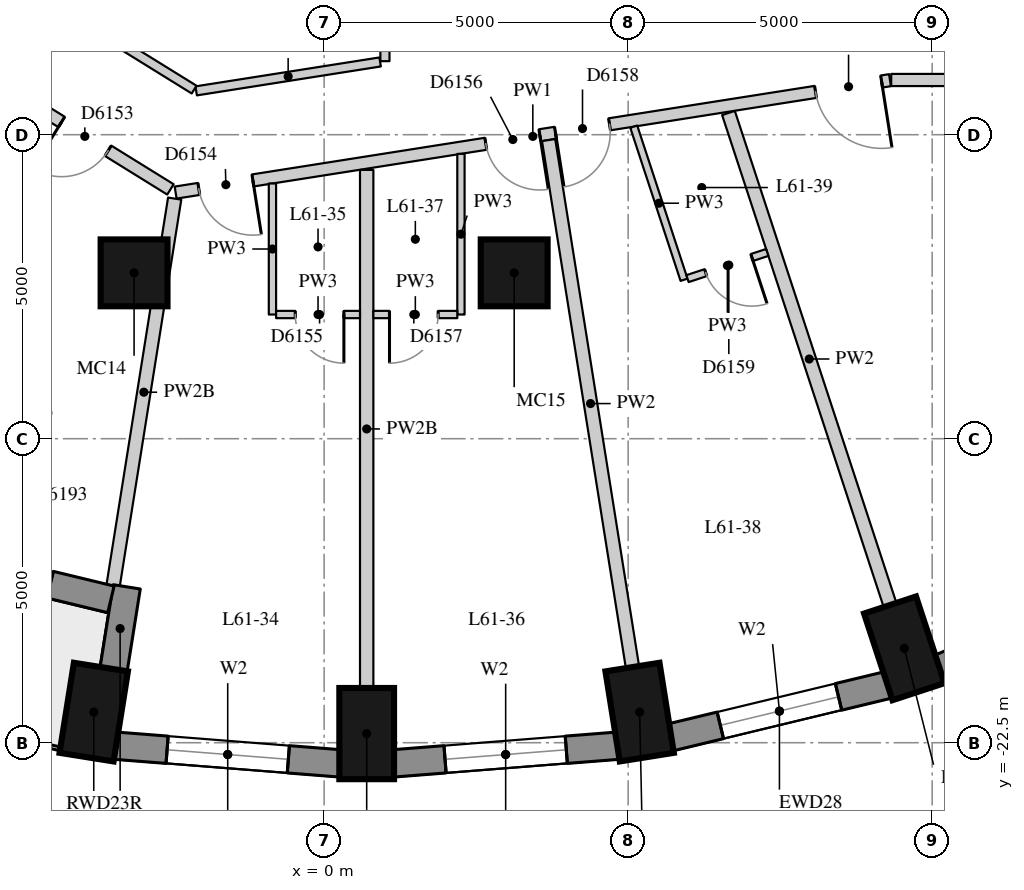
"""IFC4 building model, lengths in metres.
Left out: names, types, materials, properties, quantities, classifications, styles, units other than length and angle.
Written with IfcOpenShell. Run it as: python <this file> out.ifc"""

import sys

from ifc_helpers import new_model, si_unit, direction, frame, frame_2d, origin, origin_2d, place, context, subcontext, project, spatial, rectangle, extrude, element, fill, save


model = new_model("IFC4")
c1 = context("Model", 3, precision=1e-05, world=origin(), true_north=direction((0.0, 1.0)))
c2 = subcontext(c1, "Body", "Model", "MODEL_VIEW")
j1 = project(units=[si_unit("LENGTHUNIT", "METRE"), si_unit("PLANEANGLEUNIT", "RADIAN")], contexts=[c1])
p1 = place(None, origin())
s1 = spatial("IfcSite", under=j1, at=p1, CompositionType="ELEMENT")
p2 = place(p1, origin())
s2 = spatial("IfcBuilding", under=s1, at=p2, CompositionType="ELEMENT")
p3 = place(p2, frame((0.0, 0.0, 215.6)))
s3 = spatial("IfcBuildingStorey", under=s2, at=p3, CompositionType="ELEMENT", Elevation=215.6)
for number, where, z_axis, x_axis in (
    (1, (-3.789, -21.997, 0.0), (0.0, 0.0, 1.0), (-0.157, -0.988, 0.0)),
    (2, (0.7, -22.35, 0.0), (0.0, 0.0, 1.0), (0.0, -1.0, 0.0)),
    (3, (5.189, -21.997, 0.0), (0.0, 0.0, 1.0), (0.157, -0.988, 0.0)),
    (4, (9.541, -20.948, 0.0), (0.0, 0.0, 1.0), (0.312, -0.95, 0.0)),
):
    element("IfcColumn", number, at=place(p3, frame(where, z_axis=z_axis, x_axis=x_axis)), inside=s3, PredefinedType="COLUMN", context=c2, shape_type="SweptSolid", body=[
        extrude(rectangle(XDim=1.5, YDim=0.9, at=origin_2d()), origin(), (0.0, 0.0, 1.0), 3.3),
    ])
for number, where, z_axis, x_axis in (
    (5, (-3.126, -14.772, 0.0), (0.0, 0.0, 1.0), (1.0, 0.0, 0.0)),
    (6, (3.126, -14.772, 0.0), (0.0, 0.0, 1.0), (1.0, 0.0, 0.0)),
):
    element("IfcColumn", number, at=place(p3, frame(where, z_axis=z_axis, x_axis=x_axis)), inside=s3, PredefinedType="COLUMN", context=c2, shape_type="SweptSolid", body=[
        extrude(rectangle(XDim=1.1, YDim=1.1, at=origin_2d()), origin(), (0.0, 0.0, 1.0), 3.3),
    ])
p4 = place(p3, frame((-3.441, -22.548, 0.0), z_axis=(0.0, 0.0, 1.0), x_axis=(0.996913971077, -0.078501810629, 0.0)))
e7 = element("IfcWall", 7, at=p4, inside=s3, PredefinedType="SOLIDWALL", context=c2, shape_type="SweptSolid", body=[
    extrude(rectangle(XDim=3.723, YDim=0.45, at=frame_2d((1.861, 0.0))), origin(), (0.0, 0.0, 1.0), 3.02),
])
p5 = place(p4, frame((0.861, 0.0, 0.4)))
e8 = element("IfcOpeningElement", 8, at=p5, cuts=e7, PredefinedType="OPENING", context=c2, shape_type="SweptSolid", body=[
    extrude(rectangle(XDim=2.0, YDim=1.75, at=frame_2d((1.0, 0.875))), frame((0.0, 0.235, 0.0), z_axis=(0.0, -1.0, 0.0), x_axis=(1.0, 0.0, 0.0)), (0.0, 0.0, 1.0), 0.47),
])
p6 = place(p3, frame((1.13, -22.841, 0.0), z_axis=(0.0, 0.0, 1.0), x_axis=(0.996913566885, 0.078506943392, 0.0)))
e9 = element("IfcWall", 9, at=p6, inside=s3, PredefinedType="SOLIDWALL", context=c2, shape_type="SweptSolid", body=[
    extrude(rectangle(XDim=3.722, YDim=0.45, at=frame_2d((1.861, 0.0))), origin(), (0.0, 0.0, 1.0), 3.02),
])
p7 = place(p6, frame((0.861, 0.0, 0.4)))
e10 = element("IfcOpeningElement", 10, at=p7, cuts=e9, PredefinedType="OPENING", context=c2, shape_type="SweptSolid", body=[
    extrude(rectangle(XDim=2.0, YDim=1.75, at=frame_2d((1.0, 0.875))), frame((0.0, 0.235, 0.0), z_axis=(0.0, -1.0, 0.0), x_axis=(1.0, 0.0, 0.0)), (0.0, 0.0, 1.0), 0.47),
])
p8 = place(p3, frame((5.691, -22.414, 0.0), z_axis=(0.0, 0.0, 1.0), x_axis=(0.9721584944, 0.234324266275, 0.0)))
e11 = element("IfcWall", 11, at=p8, inside=s3, PredefinedType="SOLIDWALL", context=c2, shape_type="SweptSolid", body=[
    extrude(rectangle(XDim=3.698, YDim=0.45, at=frame_2d((1.849, 0.0))), origin(), (0.0, 0.0, 1.0), 3.02),
])
p9 = place(p8, frame((0.849, 0.0, 0.4)))
e12 = element("IfcOpeningElement", 12, at=p9, cuts=e11, PredefinedType="OPENING", context=c2, shape_type="SweptSolid", body=[
    extrude(rectangle(XDim=2.0, YDim=1.75, at=frame_2d((1.0, 0.875))), frame((0.0, 0.235, 0.0), z_axis=(0.0, -1.0, 0.0), x_axis=(1.0, 0.0, 0.0)), (0.0, 0.0, 1.0), 0.47),
])
p10 = place(p3, frame((10.103, -21.279, 0.0), z_axis=(0.0, 0.0, 1.0), x_axis=(0.922168222612, 0.386789050006, 0.0)))
e13 = element("IfcWall", 13, at=p10, inside=s3, PredefinedType="SOLIDWALL", context=c2, shape_type="SweptSolid", body=[
    extrude(rectangle(XDim=3.651, YDim=0.45, at=frame_2d((1.825, 0.0))), origin(), (0.0, 0.0, 1.0), 3.02),
])
p11 = place(p10, frame((0.825, 0.0, 0.4)))
e14 = element("IfcOpeningElement", 14, at=p11, cuts=e13, PredefinedType="OPENING", context=c2, shape_type="SweptSolid", body=[
    extrude(rectangle(XDim=2.0, YDim=1.75, at=frame_2d((1.0, 0.875))), frame((0.0, 0.235, 0.0), z_axis=(0.0, -1.0, 0.0), x_axis=(1.0, 0.0, 0.0)), (0.0, 0.0, 1.0), 0.47),
])
p12 = place(p3, frame((-3.464, -21.309, 0.0), z_axis=(0.0, 0.0, 1.0), x_axis=(0.157161757203, 0.98757287431, 0.0)))
e15 = element("IfcWall", 15, at=p12, inside=s3, PredefinedType="SOLIDWALL", context=c2, shape_type="SweptSolid", body=[
    extrude(rectangle(XDim=1.39, YDim=0.45, at=frame_2d((0.695, 0.0))), origin(), (0.0, 0.0, 1.0), 2.57),
])
p13 = place(p3, frame((-7.596, -19.154, 0.0), z_axis=(0.0, 0.0, 1.0), x_axis=(0.972004107579, -0.234963858602, 0.0)))
e16 = element("IfcWall", 16, at=p13, inside=s3, PredefinedType="SOLIDWALL", context=c2, shape_type="SweptSolid", body=[
    extrude(rectangle(XDim=4.207, YDim=0.45, at=frame_2d((2.104, 0.0))), origin(), (0.0, 0.0, 1.0), 3.02),
])
p14 = place(p13, frame((1.029, 0.0, 0.4)))
e17 = element("IfcOpeningElement", 17, at=p14, cuts=e16, PredefinedType="OPENING", context=c2, shape_type="SweptSolid", body=[
    extrude(rectangle(XDim=1.0, YDim=1.75, at=frame_2d((0.5, 0.875))), frame((0.0, 0.235, 0.0), z_axis=(0.0, -1.0, 0.0), x_axis=(1.0, 0.0, 0.0)), (0.0, 0.0, 1.0), 0.47),
])
p15 = place(p13, frame((2.179, 0.0, 0.0)))
e18 = element("IfcOpeningElement", 18, at=p15, cuts=e16, PredefinedType="OPENING", context=c2, shape_type="SweptSolid", body=[
    extrude(rectangle(XDim=1.0, YDim=2.15, at=frame_2d((0.5, 1.075))), frame((0.0, 0.235, 0.0), z_axis=(0.0, -1.0, 0.0), x_axis=(1.0, 0.0, 0.0)), (0.0, 0.0, 1.0), 0.47),
])
p16 = place(p3, frame((17.5, -11.6, 0.0), z_axis=(0.0, 0.0, 1.0), x_axis=(-1.0, 0.0, 0.0)))
e19 = element("IfcWall", 19, at=p16, inside=s3, PredefinedType="PARTITIONING", context=c2, shape_type="SweptSolid", body=[
    extrude(rectangle(XDim=8.174, YDim=0.2, at=frame_2d((4.087, 0.0))), origin(), (0.0, 0.0, 1.0), 3.02),
])
p17 = place(p16, frame((1.208, 0.0, 0.0)))
e20 = element("IfcOpeningElement", 20, at=p17, cuts=e19, PredefinedType="OPENING", context=c2, shape_type="SweptSolid", body=[
    extrude(rectangle(XDim=1.8, YDim=2.1, at=frame_2d((0.9, 1.05))), frame((0.0, 0.11, 0.0), z_axis=(0.0, -1.0, 0.0), x_axis=(1.0, 0.0, 0.0)), (0.0, 0.0, 1.0), 0.22),
])
p18 = place(p3, frame((9.306, -11.603, 0.0), z_axis=(0.0, 0.0, 1.0), x_axis=(-0.987842562114, -0.155457622769, 0.0)))
e21 = element("IfcWall", 21, at=p18, inside=s3, PredefinedType="PARTITIONING", context=c2, shape_type="SweptSolid", body=[
    extrude(rectangle(XDim=11.893, YDim=0.2, at=frame_2d((5.947, 0.0))), origin(), (0.0, 0.0, 1.0), 3.02),
])
p19 = place(p18, frame((10.607, 0.0, 0.0)))
e22 = element("IfcOpeningElement", 22, at=p19, cuts=e21, PredefinedType="OPENING", context=c2, shape_type="SweptSolid", body=[
    extrude(rectangle(XDim=0.9, YDim=2.1, at=frame_2d((0.45, 1.05))), frame((0.0, 0.11, 0.0), z_axis=(0.0, -1.0, 0.0), x_axis=(1.0, 0.0, 0.0)), (0.0, 0.0, 1.0), 0.22),
])
p20 = place(p18, frame((5.829, 0.0, 0.0)))
e23 = element("IfcOpeningElement", 23, at=p20, cuts=e21, PredefinedType="OPENING", context=c2, shape_type="SweptSolid", body=[
    extrude(rectangle(XDim=0.9, YDim=2.1, at=frame_2d((0.45, 1.05))), frame((0.0, 0.11, 0.0), z_axis=(0.0, -1.0, 0.0), x_axis=(1.0, 0.0, 0.0)), (0.0, 0.0, 1.0), 0.22),
])
p21 = place(p18, frame((4.669, 0.0, 0.0)))
e24 = element("IfcOpeningElement", 24, at=p21, cuts=e21, PredefinedType="OPENING", context=c2, shape_type="SweptSolid", body=[
    extrude(rectangle(XDim=0.9, YDim=2.1, at=frame_2d((0.45, 1.05))), frame((0.0, 0.11, 0.0), z_axis=(0.0, -1.0, 0.0), x_axis=(1.0, 0.0, 0.0)), (0.0, 0.0, 1.0), 0.22),
])
p22 = place(p18, frame((0.14, 0.0, 0.0)))
e25 = element("IfcOpeningElement", 25, at=p22, cuts=e21, PredefinedType="OPENING", context=c2, shape_type="SweptSolid", body=[
    extrude(rectangle(XDim=1.1, YDim=2.1, at=frame_2d((0.55, 1.05))), frame((0.0, 0.11, 0.0), z_axis=(0.0, -1.0, 0.0), x_axis=(1.0, 0.0, 0.0)), (0.0, 0.0, 1.0), 0.22),
])
p23 = place(p3, frame((-2.528, -13.4, 0.0), z_axis=(0.0, 0.0, 1.0), x_axis=(-0.850088088191, 0.526640524757, 0.0)))
e26 = element("IfcWall", 26, at=p23, inside=s3, PredefinedType="PARTITIONING", context=c2, shape_type="SweptSolid", body=[
    extrude(rectangle(XDim=6.084, YDim=0.2, at=frame_2d((3.042, 0.0))), origin(), (0.0, 0.0, 1.0), 3.02),
])
p24 = place(p23, frame((4.031, 0.0, 0.0)))
e27 = element("IfcOpeningElement", 27, at=p24, cuts=e26, PredefinedType="OPENING", context=c2, shape_type="SweptSolid", body=[
    extrude(rectangle(XDim=1.1, YDim=2.1, at=frame_2d((0.55, 1.05))), frame((0.0, 0.11, 0.0), z_axis=(0.0, -1.0, 0.0), x_axis=(1.0, 0.0, 0.0)), (0.0, 0.0, 1.0), 0.22),
])
p25 = place(p23, frame((1.206, 0.0, 0.0)))
e28 = element("IfcOpeningElement", 28, at=p25, cuts=e26, PredefinedType="OPENING", context=c2, shape_type="SweptSolid", body=[
    extrude(rectangle(XDim=0.9, YDim=2.1, at=frame_2d((0.45, 1.05))), frame((0.0, 0.11, 0.0), z_axis=(0.0, -1.0, 0.0), x_axis=(1.0, 0.0, 0.0)), (0.0, 0.0, 1.0), 0.22),
])
p26 = place(p3, frame((1.0, -9.23, 0.0), z_axis=(0.0, 0.0, 1.0), x_axis=(0.0, -1.0, 0.0)))
e29 = element("IfcWall", 29, at=p26, inside=s3, PredefinedType="PARTITIONING", context=c2, shape_type="SweptSolid", body=[
    extrude(rectangle(XDim=2.061, YDim=0.15, at=frame_2d((1.03, 0.0))), origin(), (0.0, 0.0, 1.0), 3.02),
])
p27 = place(p3, frame((0.921, -11.303, 0.0), z_axis=(0.0, 0.0, 1.0), x_axis=(-0.987854584084, -0.15538121091, 0.0)))
e30 = element("IfcWall", 30, at=p27, inside=s3, PredefinedType="PARTITIONING", context=c2, shape_type="SweptSolid", body=[
    extrude(rectangle(XDim=3.062, YDim=0.15, at=frame_2d((1.531, 0.0))), origin(), (0.0, 0.0, 1.0), 3.02),
])
p28 = place(p3, frame((-2.138, -11.758, 0.0), z_axis=(0.0, 0.0, 1.0), x_axis=(-0.850109654363, 0.526605711666, 0.0)))
e31 = element("IfcWall", 31, at=p28, inside=s3, PredefinedType="PARTITIONING", context=c2, shape_type="SweptSolid", body=[
    extrude(rectangle(XDim=2.778, YDim=0.15, at=frame_2d((1.389, 0.0))), origin(), (0.0, 0.0, 1.0), 3.02),
])
p29 = place(p3, frame((-3.471, -19.919, 0.0), z_axis=(0.0, 0.0, 1.0), x_axis=(0.157082319053, 0.987585512774, 0.0)))
e32 = element("IfcWall", 32, at=p29, inside=s3, PredefinedType="PARTITIONING", context=c2, shape_type="SweptSolid", body=[
    extrude(rectangle(XDim=6.448, YDim=0.22, at=frame_2d((3.224, 0.0))), origin(), (0.0, 0.0, 1.0), 2.57),
])
p30 = place(p3, frame((0.7, -21.6, 0.0), z_axis=(0.0, 0.0, 1.0), x_axis=(0.0, 1.0, 0.0)))
e33 = element("IfcWall", 33, at=p30, inside=s3, PredefinedType="PARTITIONING", context=c2, shape_type="SweptSolid", body=[
    extrude(rectangle(XDim=8.521, YDim=0.22, at=frame_2d((4.261, 0.0))), origin(), (0.0, 0.0, 1.0), 2.57),
])
p31 = place(p3, frame((5.071, -21.256, 0.0), z_axis=(0.0, 0.0, 1.0), x_axis=(-0.157132312818, 0.987577559622, 0.0)))
e34 = element("IfcWall", 34, at=p31, inside=s3, PredefinedType="PARTITIONING", context=c2, shape_type="SweptSolid", body=[
    extrude(rectangle(XDim=8.777, YDim=0.22, at=frame_2d((4.389, 0.0))), origin(), (0.0, 0.0, 1.0), 3.02),
])
p32 = place(p3, frame((9.307, -20.235, 0.0), z_axis=(0.0, 0.0, 1.0), x_axis=(-0.311959631661, 0.950095357432, 0.0)))
e35 = element("IfcWall", 35, at=p32, inside=s3, PredefinedType="PARTITIONING", context=c2, shape_type="SweptSolid", body=[
    extrude(rectangle(XDim=8.518, YDim=0.22, at=frame_2d((4.259, 0.0))), origin(), (0.0, 0.0, 1.0), 3.02),
])
p33 = place(p3, frame((-0.85, -13.303, 0.0), z_axis=(0.0, 0.0, 1.0), x_axis=(0.0, -1.0, 0.0)))
e36 = element("IfcWall", 36, at=p33, inside=s3, PredefinedType="PARTITIONING", context=c2, shape_type="SweptSolid", body=[
    extrude(rectangle(XDim=2.155, YDim=0.12, at=frame_2d((1.077, 0.0))), origin(), (0.0, 0.0, 1.0), 3.02),
])
p34 = place(p3, frame((2.25, -12.815, 0.0), z_axis=(0.0, 0.0, 1.0), x_axis=(0.0, -1.0, 0.0)))
e37 = element("IfcWall", 37, at=p34, inside=s3, PredefinedType="PARTITIONING", context=c2, shape_type="SweptSolid", body=[
    extrude(rectangle(XDim=2.643, YDim=0.12, at=frame_2d((1.321, 0.0))), origin(), (0.0, 0.0, 1.0), 3.02),
])
p35 = place(p3, frame((5.092, -12.368, 0.0), z_axis=(0.0, 0.0, 1.0), x_axis=(0.311969203188, -0.95009221461, 0.0)))
e38 = element("IfcWall", 38, at=p35, inside=s3, PredefinedType="PARTITIONING", context=c2, shape_type="SweptSolid", body=[
    extrude(rectangle(XDim=2.651, YDim=0.12, at=frame_2d((1.325, 0.0))), origin(), (0.0, 0.0, 1.0), 3.02),
])
p36 = place(p3, frame((-0.79, -15.458, 0.0), z_axis=(0.0, 0.0, 1.0), x_axis=(1.0, 0.0, 0.0)))
e39 = element("IfcWall", 39, at=p36, inside=s3, PredefinedType="PARTITIONING", context=c2, shape_type="SweptSolid", body=[
    extrude(rectangle(XDim=1.38, YDim=0.12, at=frame_2d((0.69, 0.0))), origin(), (0.0, 0.0, 1.0), 3.02),
])
p37 = place(p36, frame((0.315, 0.0, 0.0)))
e40 = element("IfcOpeningElement", 40, at=p37, cuts=e39, PredefinedType="OPENING", context=c2, shape_type="SweptSolid", body=[
    extrude(rectangle(XDim=0.8, YDim=2.1, at=frame_2d((0.4, 1.05))), frame((0.0, 0.07, 0.0), z_axis=(0.0, -1.0, 0.0), x_axis=(1.0, 0.0, 0.0)), (0.0, 0.0, 1.0), 0.14),
])
p38 = place(p3, frame((2.19, -15.458, 0.0), z_axis=(0.0, 0.0, 1.0), x_axis=(-1.0, 0.0, 0.0)))
e41 = element("IfcWall", 41, at=p38, inside=s3, PredefinedType="PARTITIONING", context=c2, shape_type="SweptSolid", body=[
    extrude(rectangle(XDim=1.38, YDim=0.12, at=frame_2d((0.69, 0.0))), origin(), (0.0, 0.0, 1.0), 3.02),
])
p39 = place(p38, frame((0.315, 0.0, 0.0)))
e42 = element("IfcOpeningElement", 42, at=p39, cuts=e41, PredefinedType="OPENING", context=c2, shape_type="SweptSolid", body=[
    extrude(rectangle(XDim=0.8, YDim=2.1, at=frame_2d((0.4, 1.05))), frame((0.0, 0.07, 0.0), z_axis=(0.0, -1.0, 0.0), x_axis=(1.0, 0.0, 0.0)), (0.0, 0.0, 1.0), 0.14),
])
p40 = place(p3, frame((5.976, -14.867, 0.0), z_axis=(0.0, 0.0, 1.0), x_axis=(0.950123887932, 0.311872726573, 0.0)))
e43 = element("IfcWall", 43, at=p40, inside=s3, PredefinedType="PARTITIONING", context=c2, shape_type="SweptSolid", body=[
    extrude(rectangle(XDim=1.38, YDim=0.12, at=frame_2d((0.69, 0.0))), origin(), (0.0, 0.0, 1.0), 3.02),
])
p41 = place(p40, frame((0.315, 0.0, 0.0)))
e44 = element("IfcOpeningElement", 44, at=p41, cuts=e43, PredefinedType="OPENING", context=c2, shape_type="SweptSolid", body=[
    extrude(rectangle(XDim=0.8, YDim=2.1, at=frame_2d((0.4, 1.05))), frame((0.0, 0.07, 0.0), z_axis=(0.0, -1.0, 0.0), x_axis=(1.0, 0.0, 0.0)), (0.0, 0.0, 1.0), 0.14),
])
p42 = place(p5, origin())
e45 = element("IfcWindow", 45, at=p42, inside=s3, PartitioningType="SINGLE_PANEL", PredefinedType="WINDOW", context=c2, shape_type="SweptSolid", body=[
    extrude(rectangle(XDim=2.0, YDim=1.75, at=frame_2d((1.0, 0.875))), frame((0.0, 0.035, 0.0), z_axis=(0.0, -1.0, 0.0), x_axis=(1.0, 0.0, 0.0)), (0.0, 0.0, 1.0), 0.06),
])
fill(e8, e45)
p43 = place(p7, origin())
e46 = element("IfcWindow", 46, at=p43, inside=s3, PartitioningType="SINGLE_PANEL", PredefinedType="WINDOW", context=c2, shape_type="SweptSolid", body=[
    extrude(rectangle(XDim=2.0, YDim=1.75, at=frame_2d((1.0, 0.875))), frame((0.0, 0.035, 0.0), z_axis=(0.0, -1.0, 0.0), x_axis=(1.0, 0.0, 0.0)), (0.0, 0.0, 1.0), 0.06),
])
fill(e10, e46)
p44 = place(p9, origin())
e47 = element("IfcWindow", 47, at=p44, inside=s3, PartitioningType="SINGLE_PANEL", PredefinedType="WINDOW", context=c2, shape_type="SweptSolid", body=[
    extrude(rectangle(XDim=2.0, YDim=1.75, at=frame_2d((1.0, 0.875))), frame((0.0, 0.035, 0.0), z_axis=(0.0, -1.0, 0.0), x_axis=(1.0, 0.0, 0.0)), (0.0, 0.0, 1.0), 0.06),
])
fill(e12, e47)
p45 = place(p25, origin())
e48 = element("IfcDoor", 48, at=p45, inside=s3, OperationType="SINGLE_SWING_RIGHT", PredefinedType="DOOR", context=c2, shape_type="SweptSolid", body=[
    extrude(rectangle(XDim=0.9, YDim=2.1, at=frame_2d((0.45, 1.05))), frame((0.0, 0.025, 0.0), z_axis=(0.0, -1.0, 0.0), x_axis=(1.0, 0.0, 0.0)), (0.0, 0.0, 1.0), 0.05),
])
fill(e28, e48)
p46 = place(p19, origin())
e49 = element("IfcDoor", 49, at=p46, inside=s3, OperationType="SINGLE_SWING_LEFT", PredefinedType="DOOR", context=c2, shape_type="SweptSolid", body=[
    extrude(rectangle(XDim=0.9, YDim=2.1, at=frame_2d((0.45, 1.05))), frame((0.0, 0.025, 0.0), z_axis=(0.0, -1.0, 0.0), x_axis=(1.0, 0.0, 0.0)), (0.0, 0.0, 1.0), 0.05),
])
fill(e22, e49)
p47 = place(p37, origin())
e50 = element("IfcDoor", 50, at=p47, inside=s3, OperationType="SINGLE_SWING_LEFT", PredefinedType="DOOR", context=c2, shape_type="SweptSolid", body=[
    extrude(rectangle(XDim=0.8, YDim=2.1, at=frame_2d((0.4, 1.05))), frame((0.0, 0.025, 0.0), z_axis=(0.0, -1.0, 0.0), x_axis=(1.0, 0.0, 0.0)), (0.0, 0.0, 1.0), 0.05),
])
fill(e40, e50)
p48 = place(p20, origin())
e51 = element("IfcDoor", 51, at=p48, inside=s3, OperationType="SINGLE_SWING_LEFT", PredefinedType="DOOR", context=c2, shape_type="SweptSolid", body=[
    extrude(rectangle(XDim=0.9, YDim=2.1, at=frame_2d((0.45, 1.05))), frame((0.0, 0.025, 0.0), z_axis=(0.0, -1.0, 0.0), x_axis=(1.0, 0.0, 0.0)), (0.0, 0.0, 1.0), 0.05),
])
fill(e23, e51)
p49 = place(p39, origin())
e52 = element("IfcDoor", 52, at=p49, inside=s3, OperationType="SINGLE_SWING_RIGHT", PredefinedType="DOOR", context=c2, shape_type="SweptSolid", body=[
    extrude(rectangle(XDim=0.8, YDim=2.1, at=frame_2d((0.4, 1.05))), frame((0.0, 0.025, 0.0), z_axis=(0.0, -1.0, 0.0), x_axis=(1.0, 0.0, 0.0)), (0.0, 0.0, 1.0), 0.05),
])
fill(e42, e52)
p50 = place(p21, origin())
e53 = element("IfcDoor", 53, at=p50, inside=s3, OperationType="SINGLE_SWING_RIGHT", PredefinedType="DOOR", context=c2, shape_type="SweptSolid", body=[
    extrude(rectangle(XDim=0.9, YDim=2.1, at=frame_2d((0.45, 1.05))), frame((0.0, 0.025, 0.0), z_axis=(0.0, -1.0, 0.0), x_axis=(1.0, 0.0, 0.0)), (0.0, 0.0, 1.0), 0.05),
])
fill(e24, e53)
p51 = place(p41, origin())
e54 = element("IfcDoor", 54, at=p51, inside=s3, OperationType="SINGLE_SWING_LEFT", PredefinedType="DOOR", context=c2, shape_type="SweptSolid", body=[
    extrude(rectangle(XDim=0.8, YDim=2.1, at=frame_2d((0.4, 1.05))), frame((0.0, 0.025, 0.0), z_axis=(0.0, -1.0, 0.0), x_axis=(1.0, 0.0, 0.0)), (0.0, 0.0, 1.0), 0.05),
])
fill(e44, e54)
p52 = place(p22, origin())
e55 = element("IfcDoor", 55, at=p52, inside=s3, OperationType="SINGLE_SWING_LEFT", PredefinedType="DOOR", context=c2, shape_type="SweptSolid", body=[
    extrude(rectangle(XDim=1.1, YDim=2.1, at=frame_2d((0.55, 1.05))), frame((0.0, 0.025, 0.0), z_axis=(0.0, -1.0, 0.0), x_axis=(1.0, 0.0, 0.0)), (0.0, 0.0, 1.0), 0.05),
])
fill(e25, e55)
save(model, sys.argv[1])
